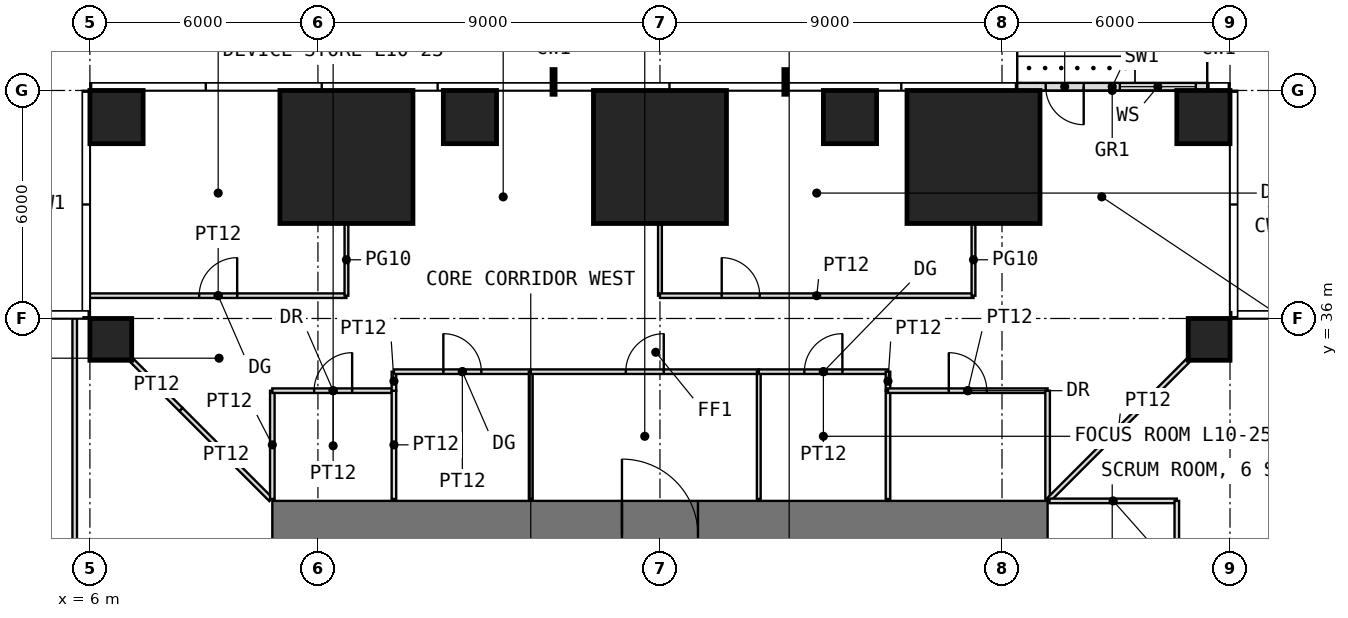
"""IFC4 building model, lengths in metres.
Left out: names, types, materials, properties, quantities, classifications, styles, units other than length and angle.
Written with IfcOpenShell. Run it as: python <this file> out.ifc"""

import sys

from ifc_helpers import new_model, si_unit, direction, frame, frame_2d, origin, origin_2d, place, context, subcontext, project, spatial, rectangle, extrude, element, fill, save


model = new_model("IFC4")
c1 = context("Model", 3, precision=1e-05, world=origin(), true_north=direction((0.0, 1.0)))
c2 = subcontext(c1, "Body", "Model", "MODEL_VIEW")
j1 = project(units=[si_unit("LENGTHUNIT", "METRE"), si_unit("PLANEANGLEUNIT", "RADIAN")], contexts=[c1])
p1 = place(None, origin())
s1 = spatial("IfcSite", under=j1, at=p1, CompositionType="ELEMENT")
p2 = place(p1, origin())
s2 = spatial("IfcBuilding", under=s1, at=p2, CompositionType="ELEMENT")
p3 = place(p2, frame((0.0, 0.0, 46.5)))
s3 = spatial("IfcBuildingStorey", under=s2, at=p3, CompositionType="ELEMENT", Elevation=46.5)
for number, where, z_axis, x_axis in (
    (1, (6.55, 35.45, 0.0), (0.0, 0.0, 1.0), (1.0, 0.0, 0.0)),
    (2, (35.45, 35.45, 0.0), (0.0, 0.0, 1.0), (1.0, 0.0, 0.0)),
):
    element("IfcColumn", number, at=place(p3, frame(where, z_axis=z_axis, x_axis=x_axis)), inside=s3, PredefinedType="COLUMN", context=c2, shape_type="SweptSolid", body=[
        extrude(rectangle(XDim=1.1, YDim=1.1, at=origin_2d()), origin(), (0.0, 0.0, 1.0), 4.0),
    ])
p4 = place(p3, frame((6.7, 41.3, 0.0), z_axis=(0.0, 0.0, 1.0), x_axis=(1.0, 0.0, 0.0)))
e3 = element("IfcColumn", 3, at=p4, inside=s3, PredefinedType="COLUMN", context=c2, shape_type="SweptSolid", body=[
    extrude(rectangle(XDim=1.4, YDim=1.4, at=origin_2d()), origin(), (0.0, 0.0, 1.0), 4.0),
])
p5 = place(p3, frame((12.75, 40.25, 0.0), z_axis=(0.0, 0.0, 1.0), x_axis=(1.0, 0.0, 0.0)))
e4 = element("IfcColumn", 4, at=p5, inside=s3, PredefinedType="COLUMN", context=c2, shape_type="SweptSolid", body=[
    extrude(rectangle(XDim=3.5, YDim=3.5, at=origin_2d()), origin(), (0.0, 0.0, 1.0), 4.0),
])
p6 = place(p3, frame((16.0, 41.3, 0.0), z_axis=(0.0, 0.0, 1.0), x_axis=(1.0, 0.0, 0.0)))
e5 = element("IfcColumn", 5, at=p6, inside=s3, PredefinedType="COLUMN", context=c2, shape_type="SweptSolid", body=[
    extrude(rectangle(XDim=1.4, YDim=1.4, at=origin_2d()), origin(), (0.0, 0.0, 1.0), 4.0),
])
p7 = place(p3, frame((21.0, 40.25, 0.0), z_axis=(0.0, 0.0, 1.0), x_axis=(1.0, 0.0, 0.0)))
e6 = element("IfcColumn", 6, at=p7, inside=s3, PredefinedType="COLUMN", context=c2, shape_type="SweptSolid", body=[
    extrude(rectangle(XDim=3.5, YDim=3.5, at=origin_2d()), origin(), (0.0, 0.0, 1.0), 4.0),
])
p8 = place(p3, frame((26.0, 41.3, 0.0), z_axis=(0.0, 0.0, 1.0), x_axis=(1.0, 0.0, 0.0)))
e7 = element("IfcColumn", 7, at=p8, inside=s3, PredefinedType="COLUMN", context=c2, shape_type="SweptSolid", body=[
    extrude(rectangle(XDim=1.4, YDim=1.4, at=origin_2d()), origin(), (0.0, 0.0, 1.0), 4.0),
])
p9 = place(p3, frame((29.25, 40.25, 0.0), z_axis=(0.0, 0.0, 1.0), x_axis=(1.0, 0.0, 0.0)))
e8 = element("IfcColumn", 8, at=p9, inside=s3, PredefinedType="COLUMN", context=c2, shape_type="SweptSolid", body=[
    extrude(rectangle(XDim=3.5, YDim=3.5, at=origin_2d()), origin(), (0.0, 0.0, 1.0), 4.0),
])
p10 = place(p3, frame((35.3, 41.3, 0.0), z_axis=(0.0, 0.0, 1.0), x_axis=(1.0, 0.0, 0.0)))
e9 = element("IfcColumn", 9, at=p10, inside=s3, PredefinedType="COLUMN", context=c2, shape_type="SweptSolid", body=[
    extrude(rectangle(XDim=1.4, YDim=1.4, at=origin_2d()), origin(), (0.0, 0.0, 1.0), 4.0),
])
p11 = place(p3, frame((35.4, 42.1, 0.0), z_axis=(0.0, 0.0, 1.0), x_axis=(-1.0, 0.0, 0.0)))
e10 = element("IfcWall", 10, at=p11, inside=s3, PredefinedType="USERDEFINED", context=c2, shape_type="SweptSolid", body=[
    extrude(rectangle(XDim=5.0, YDim=0.2, at=frame_2d((2.5, 0.0))), origin(), (0.0, 0.0, 1.0), 3.75),
])
p12 = place(p11, frame((3.25, 0.0, 0.0)))
e11 = element("IfcOpeningElement", 11, at=p12, cuts=e10, PredefinedType="OPENING", context=c2, shape_type="SweptSolid", body=[
    extrude(rectangle(XDim=1.0, YDim=2.4, at=frame_2d((0.5, 1.2))), frame((0.0, 0.11, 0.0), z_axis=(0.0, -1.0, 0.0), x_axis=(1.0, 0.0, 0.0)), (0.0, 0.0, 1.0), 0.22),
])
p13 = place(p11, frame((0.3, 0.0, 0.3)))
e12 = element("IfcOpeningElement", 12, at=p13, cuts=e10, PredefinedType="OPENING", context=c2, shape_type="SweptSolid", body=[
    extrude(rectangle(XDim=2.0, YDim=2.7, at=frame_2d((1.0, 1.35))), frame((0.0, 0.11, 0.0), z_axis=(0.0, -1.0, 0.0), x_axis=(1.0, 0.0, 0.0)), (0.0, 0.0, 1.0), 0.22),
])
p14 = place(p3, frame((10.8, 30.3, -0.05), z_axis=(0.0, 0.0, 1.0), x_axis=(1.0, 0.0, 0.0)))
e13 = element("IfcWall", 13, at=p14, inside=s3, PredefinedType="SHEAR", context=c2, shape_type="SweptSolid", body=[
    extrude(rectangle(XDim=20.4, YDim=1.8, at=frame_2d((10.2, 0.0))), origin(), (0.0, 0.0, 1.0), 4.0),
])
p15 = place(p14, frame((9.2, 0.0, 0.05)))
e14 = element("IfcOpeningElement", 14, at=p15, cuts=e13, PredefinedType="OPENING", context=c2, shape_type="SweptSolid", body=[
    extrude(rectangle(XDim=2.0, YDim=2.2, at=frame_2d((1.0, 1.1))), frame((0.0, 0.91, 0.0), z_axis=(0.0, -1.0, 0.0), x_axis=(1.0, 0.0, 0.0)), (0.0, 0.0, 1.0), 1.82),
])
p16 = place(p3, frame((5.6, 6.0, 0.0), z_axis=(0.0, 0.0, 1.0), x_axis=(0.0, 1.0, 0.0)))
e15 = element("IfcWall", 15, at=p16, inside=s3, PredefinedType="PARTITIONING", context=c2, shape_type="SweptSolid", body=[
    extrude(rectangle(XDim=30.0, YDim=0.12, at=frame_2d((15.0, 0.0))), origin(), (0.0, 0.0, 1.0), 3.75),
])
p17 = place(p16, frame((14.5, 0.0, 0.0)))
e16 = element("IfcOpeningElement", 16, at=p17, cuts=e15, PredefinedType="OPENING", context=c2, shape_type="SweptSolid", body=[
    extrude(rectangle(XDim=1.0, YDim=2.4, at=frame_2d((0.5, 1.2))), frame((0.0, 0.07, 0.0), z_axis=(0.0, -1.0, 0.0), x_axis=(1.0, 0.0, 0.0)), (0.0, 0.0, 1.0), 0.14),
])
p18 = place(p3, frame((6.0, 36.6, 0.0), z_axis=(0.0, 0.0, 1.0), x_axis=(1.0, 0.0, 0.0)))
e17 = element("IfcWall", 17, at=p18, inside=s3, PredefinedType="PARTITIONING", context=c2, shape_type="SweptSolid", body=[
    extrude(rectangle(XDim=6.75, YDim=0.12, at=frame_2d((3.375, 0.0))), origin(), (0.0, 0.0, 1.0), 3.75),
])
p19 = place(p18, frame((2.875, 0.0, 0.0)))
e18 = element("IfcOpeningElement", 18, at=p19, cuts=e17, PredefinedType="OPENING", context=c2, shape_type="SweptSolid", body=[
    extrude(rectangle(XDim=1.0, YDim=2.4, at=frame_2d((0.5, 1.2))), frame((0.0, 0.07, 0.0), z_axis=(0.0, -1.0, 0.0), x_axis=(1.0, 0.0, 0.0)), (0.0, 0.0, 1.0), 0.14),
])
p20 = place(p3, frame((7.11, 34.89, 0.0), z_axis=(0.0, 0.0, 1.0), x_axis=(0.707106781187, -0.707106781187, 0.0)))
e19 = element("IfcWall", 19, at=p20, inside=s3, PredefinedType="PARTITIONING", context=c2, shape_type="SweptSolid", body=[
    extrude(rectangle(XDim=1.822, YDim=0.12, at=frame_2d((0.911, 0.0))), origin(), (0.0, 0.0, 1.0), 3.75),
])
p21 = place(p3, frame((8.398, 33.602, 0.0), z_axis=(0.0, 0.0, 1.0), x_axis=(0.707106781187, -0.707106781187, 0.0)))
e20 = element("IfcWall", 20, at=p21, inside=s3, PredefinedType="PARTITIONING", context=c2, shape_type="SweptSolid", body=[
    extrude(rectangle(XDim=3.346, YDim=0.12, at=frame_2d((1.673, 0.0))), origin(), (0.0, 0.0, 1.0), 3.75),
])
p22 = place(p3, frame((10.8, 31.25, 0.0), z_axis=(0.0, 0.0, 1.0), x_axis=(0.0, 1.0, 0.0)))
e21 = element("IfcWall", 21, at=p22, inside=s3, PredefinedType="PARTITIONING", context=c2, shape_type="SweptSolid", body=[
    extrude(rectangle(XDim=2.85, YDim=0.12, at=frame_2d((1.425, 0.0))), origin(), (0.0, 0.0, 1.0), 3.75),
])
p23 = place(p3, frame((10.8, 34.1, 0.0), z_axis=(0.0, 0.0, 1.0), x_axis=(1.0, 0.0, 0.0)))
e22 = element("IfcWall", 22, at=p23, inside=s3, PredefinedType="PARTITIONING", context=c2, shape_type="SweptSolid", body=[
    extrude(rectangle(XDim=3.2, YDim=0.12, at=frame_2d((1.6, 0.0))), origin(), (0.0, 0.0, 1.0), 3.75),
])
p24 = place(p23, frame((1.1, 0.0, 0.0)))
e23 = element("IfcOpeningElement", 23, at=p24, cuts=e22, PredefinedType="OPENING", context=c2, shape_type="SweptSolid", body=[
    extrude(rectangle(XDim=1.0, YDim=2.2, at=frame_2d((0.5, 1.1))), frame((0.0, 0.07, 0.0), z_axis=(0.0, -1.0, 0.0), x_axis=(1.0, 0.0, 0.0)), (0.0, 0.0, 1.0), 0.14),
])
p25 = place(p3, frame((12.75, 36.6, 0.0), z_axis=(0.0, 0.0, 1.0), x_axis=(0.0, 1.0, 0.0)))
e24 = element("IfcWall", 24, at=p25, inside=s3, PredefinedType="PARTITIONING", context=c2, shape_type="SweptSolid", body=[
    extrude(rectangle(XDim=1.89, YDim=0.1, at=frame_2d((0.945, 0.0))), origin(), (0.0, 0.0, 1.0), 3.75),
])
p26 = place(p3, frame((14.0, 31.25, 0.0), z_axis=(0.0, 0.0, 1.0), x_axis=(0.0, 1.0, 0.0)))
e25 = element("IfcWall", 25, at=p26, inside=s3, PredefinedType="PARTITIONING", context=c2, shape_type="SweptSolid", body=[
    extrude(rectangle(XDim=2.85, YDim=0.12, at=frame_2d((1.425, 0.0))), origin(), (0.0, 0.0, 1.0), 3.75),
])
p27 = place(p3, frame((14.0, 34.1, 0.0), z_axis=(0.0, 0.0, 1.0), x_axis=(0.0, 1.0, 0.0)))
e26 = element("IfcWall", 26, at=p27, inside=s3, PredefinedType="PARTITIONING", context=c2, shape_type="SweptSolid", body=[
    extrude(rectangle(XDim=0.5, YDim=0.12, at=frame_2d((0.25, 0.0))), origin(), (0.0, 0.0, 1.0), 3.75),
])
p28 = place(p3, frame((14.0, 34.6, 0.0), z_axis=(0.0, 0.0, 1.0), x_axis=(1.0, 0.0, 0.0)))
e27 = element("IfcWall", 27, at=p28, inside=s3, PredefinedType="PARTITIONING", context=c2, shape_type="SweptSolid", body=[
    extrude(rectangle(XDim=3.6, YDim=0.12, at=frame_2d((1.8, 0.0))), origin(), (0.0, 0.0, 1.0), 3.75),
])
p29 = place(p28, frame((1.3, 0.0, 0.0)))
e28 = element("IfcOpeningElement", 28, at=p29, cuts=e27, PredefinedType="OPENING", context=c2, shape_type="SweptSolid", body=[
    extrude(rectangle(XDim=1.0, YDim=2.4, at=frame_2d((0.5, 1.2))), frame((0.0, 0.07, 0.0), z_axis=(0.0, -1.0, 0.0), x_axis=(1.0, 0.0, 0.0)), (0.0, 0.0, 1.0), 0.14),
])
p30 = place(p3, frame((17.6, 31.25, 0.0), z_axis=(0.0, 0.0, 1.0), x_axis=(0.0, 1.0, 0.0)))
e29 = element("IfcWall", 29, at=p30, inside=s3, PredefinedType="PARTITIONING", context=c2, shape_type="SweptSolid", body=[
    extrude(rectangle(XDim=3.35, YDim=0.1, at=frame_2d((1.675, 0.0))), origin(), (0.0, 0.0, 1.0), 3.75),
])
p31 = place(p3, frame((17.6, 34.6, 0.0), z_axis=(0.0, 0.0, 1.0), x_axis=(1.0, 0.0, 0.0)))
e30 = element("IfcWall", 30, at=p31, inside=s3, PredefinedType="PARTITIONING", context=c2, shape_type="SweptSolid", body=[
    extrude(rectangle(XDim=6.0, YDim=0.12, at=frame_2d((3.0, 0.0))), origin(), (0.0, 0.0, 1.0), 3.75),
])
p32 = place(p31, frame((2.5, 0.0, 0.0)))
e31 = element("IfcOpeningElement", 31, at=p32, cuts=e30, PredefinedType="OPENING", context=c2, shape_type="SweptSolid", body=[
    extrude(rectangle(XDim=1.0, YDim=2.4, at=frame_2d((0.5, 1.2))), frame((0.0, 0.07, 0.0), z_axis=(0.0, -1.0, 0.0), x_axis=(1.0, 0.0, 0.0)), (0.0, 0.0, 1.0), 0.14),
])
p33 = place(p3, frame((21.0, 36.6, 0.0), z_axis=(0.0, 0.0, 1.0), x_axis=(0.0, 1.0, 0.0)))
e32 = element("IfcWall", 32, at=p33, inside=s3, PredefinedType="PARTITIONING", context=c2, shape_type="SweptSolid", body=[
    extrude(rectangle(XDim=1.89, YDim=0.1, at=frame_2d((0.945, 0.0))), origin(), (0.0, 0.0, 1.0), 3.75),
])
p34 = place(p3, frame((21.0, 36.6, 0.0), z_axis=(0.0, 0.0, 1.0), x_axis=(1.0, 0.0, 0.0)))
e33 = element("IfcWall", 33, at=p34, inside=s3, PredefinedType="PARTITIONING", context=c2, shape_type="SweptSolid", body=[
    extrude(rectangle(XDim=8.25, YDim=0.12, at=frame_2d((4.125, 0.0))), origin(), (0.0, 0.0, 1.0), 3.75),
])
p35 = place(p34, frame((1.625, 0.0, 0.0)))
e34 = element("IfcOpeningElement", 34, at=p35, cuts=e33, PredefinedType="OPENING", context=c2, shape_type="SweptSolid", body=[
    extrude(rectangle(XDim=1.0, YDim=2.4, at=frame_2d((0.5, 1.2))), frame((0.0, 0.07, 0.0), z_axis=(0.0, -1.0, 0.0), x_axis=(1.0, 0.0, 0.0)), (0.0, 0.0, 1.0), 0.14),
])
p36 = place(p3, frame((23.6, 31.25, 0.0), z_axis=(0.0, 0.0, 1.0), x_axis=(0.0, 1.0, 0.0)))
e35 = element("IfcWall", 35, at=p36, inside=s3, PredefinedType="PARTITIONING", context=c2, shape_type="SweptSolid", body=[
    extrude(rectangle(XDim=3.35, YDim=0.1, at=frame_2d((1.675, 0.0))), origin(), (0.0, 0.0, 1.0), 3.75),
])
p37 = place(p3, frame((23.6, 34.6, 0.0), z_axis=(0.0, 0.0, 1.0), x_axis=(1.0, 0.0, 0.0)))
e36 = element("IfcWall", 36, at=p37, inside=s3, PredefinedType="PARTITIONING", context=c2, shape_type="SweptSolid", body=[
    extrude(rectangle(XDim=3.4, YDim=0.12, at=frame_2d((1.7, 0.0))), origin(), (0.0, 0.0, 1.0), 3.75),
])
p38 = place(p37, frame((1.2, 0.0, 0.0)))
e37 = element("IfcOpeningElement", 37, at=p38, cuts=e36, PredefinedType="OPENING", context=c2, shape_type="SweptSolid", body=[
    extrude(rectangle(XDim=1.0, YDim=2.4, at=frame_2d((0.5, 1.2))), frame((0.0, 0.07, 0.0), z_axis=(0.0, -1.0, 0.0), x_axis=(1.0, 0.0, 0.0)), (0.0, 0.0, 1.0), 0.14),
])
p39 = place(p3, frame((27.0, 31.25, 0.0), z_axis=(0.0, 0.0, 1.0), x_axis=(0.0, 1.0, 0.0)))
e38 = element("IfcWall", 38, at=p39, inside=s3, PredefinedType="PARTITIONING", context=c2, shape_type="SweptSolid", body=[
    extrude(rectangle(XDim=2.85, YDim=0.12, at=frame_2d((1.425, 0.0))), origin(), (0.0, 0.0, 1.0), 3.75),
])
p40 = place(p3, frame((27.0, 34.1, 0.0), z_axis=(0.0, 0.0, 1.0), x_axis=(0.0, 1.0, 0.0)))
e39 = element("IfcWall", 39, at=p40, inside=s3, PredefinedType="PARTITIONING", context=c2, shape_type="SweptSolid", body=[
    extrude(rectangle(XDim=0.5, YDim=0.12, at=frame_2d((0.25, 0.0))), origin(), (0.0, 0.0, 1.0), 3.75),
])
p41 = place(p3, frame((27.0, 34.1, 0.0), z_axis=(0.0, 0.0, 1.0), x_axis=(1.0, 0.0, 0.0)))
e40 = element("IfcWall", 40, at=p41, inside=s3, PredefinedType="PARTITIONING", context=c2, shape_type="SweptSolid", body=[
    extrude(rectangle(XDim=4.2, YDim=0.12, at=frame_2d((2.1, 0.0))), origin(), (0.0, 0.0, 1.0), 3.75),
])
p42 = place(p41, frame((1.6, 0.0, 0.0)))
e41 = element("IfcOpeningElement", 41, at=p42, cuts=e40, PredefinedType="OPENING", context=c2, shape_type="SweptSolid", body=[
    extrude(rectangle(XDim=1.0, YDim=2.2, at=frame_2d((0.5, 1.1))), frame((0.0, 0.07, 0.0), z_axis=(0.0, -1.0, 0.0), x_axis=(1.0, 0.0, 0.0)), (0.0, 0.0, 1.0), 0.14),
])
p43 = place(p3, frame((29.25, 36.6, 0.0), z_axis=(0.0, 0.0, 1.0), x_axis=(0.0, 1.0, 0.0)))
e42 = element("IfcWall", 42, at=p43, inside=s3, PredefinedType="PARTITIONING", context=c2, shape_type="SweptSolid", body=[
    extrude(rectangle(XDim=1.89, YDim=0.1, at=frame_2d((0.945, 0.0))), origin(), (0.0, 0.0, 1.0), 3.75),
])
p44 = place(p3, frame((31.2, 31.25, 0.0), z_axis=(0.0, 0.0, 1.0), x_axis=(0.0, 1.0, 0.0)))
e43 = element("IfcWall", 43, at=p44, inside=s3, PredefinedType="PARTITIONING", context=c2, shape_type="SweptSolid", body=[
    extrude(rectangle(XDim=2.85, YDim=0.12, at=frame_2d((1.425, 0.0))), origin(), (0.0, 0.0, 1.0), 3.75),
])
p45 = place(p3, frame((31.235, 31.235, 0.0), z_axis=(0.0, 0.0, 1.0), x_axis=(0.707106781187, 0.707106781187, 0.0)))
e44 = element("IfcWall", 44, at=p45, inside=s3, PredefinedType="PARTITIONING", context=c2, shape_type="SweptSolid", body=[
    extrude(rectangle(XDim=5.168, YDim=0.12, at=frame_2d((2.584, 0.0))), origin(), (0.0, 0.0, 1.0), 3.75),
])
p46 = place(p3, frame((31.25, 31.2, 0.0), z_axis=(0.0, 0.0, 1.0), x_axis=(1.0, 0.0, 0.0)))
e45 = element("IfcWall", 45, at=p46, inside=s3, PredefinedType="PARTITIONING", context=c2, shape_type="SweptSolid", body=[
    extrude(rectangle(XDim=3.35, YDim=0.12, at=frame_2d((1.675, 0.0))), origin(), (0.0, 0.0, 1.0), 3.75),
])
p47 = place(p3, frame((34.6, 25.4, 0.0), z_axis=(0.0, 0.0, 1.0), x_axis=(0.0, 1.0, 0.0)))
e46 = element("IfcWall", 46, at=p47, inside=s3, PredefinedType="PARTITIONING", context=c2, shape_type="SweptSolid", body=[
    extrude(rectangle(XDim=5.8, YDim=0.12, at=frame_2d((2.9, 0.0))), origin(), (0.0, 0.0, 1.0), 3.75),
])
p48 = place(p47, frame((2.4, 0.0, 0.0)))
e47 = element("IfcOpeningElement", 47, at=p48, cuts=e46, PredefinedType="OPENING", context=c2, shape_type="SweptSolid", body=[
    extrude(rectangle(XDim=1.0, YDim=2.4, at=frame_2d((0.5, 1.2))), frame((0.0, 0.07, 0.0), z_axis=(0.0, -1.0, 0.0), x_axis=(1.0, 0.0, 0.0)), (0.0, 0.0, 1.0), 0.14),
])
p49 = place(p12, origin())
e48 = element("IfcDoor", 48, at=p49, inside=s3, OperationType="SINGLE_SWING_LEFT", PredefinedType="DOOR", context=c2, shape_type="SweptSolid", body=[
    extrude(rectangle(XDim=1.0, YDim=2.4, at=frame_2d((0.5, 1.2))), frame((0.0, 0.025, 0.0), z_axis=(0.0, -1.0, 0.0), x_axis=(1.0, 0.0, 0.0)), (0.0, 0.0, 1.0), 0.05),
])
fill(e11, e48)
p50 = place(p13, origin())
e49 = element("IfcWindow", 49, at=p50, inside=s3, PartitioningType="SINGLE_PANEL", PredefinedType="WINDOW", context=c2, shape_type="SweptSolid", body=[
    extrude(rectangle(XDim=2.0, YDim=2.7, at=frame_2d((1.0, 1.35))), frame((0.0, 0.03, 0.0), z_axis=(0.0, -1.0, 0.0), x_axis=(1.0, 0.0, 0.0)), (0.0, 0.0, 1.0), 0.06),
])
fill(e12, e49)
p51 = place(p15, origin())
e50 = element("IfcDoor", 50, at=p51, inside=s3, OperationType="DOUBLE_DOOR_SINGLE_SWING", PredefinedType="DOOR", context=c2, shape_type="SweptSolid", body=[
    extrude(rectangle(XDim=2.0, YDim=2.2, at=frame_2d((1.0, 1.1))), frame((0.0, 0.025, 0.0), z_axis=(0.0, -1.0, 0.0), x_axis=(1.0, 0.0, 0.0)), (0.0, 0.0, 1.0), 0.05),
])
fill(e14, e50)
p52 = place(p24, origin())
e51 = element("IfcDoor", 51, at=p52, inside=s3, OperationType="SINGLE_SWING_RIGHT", PredefinedType="DOOR", context=c2, shape_type="SweptSolid", body=[
    extrude(rectangle(XDim=1.0, YDim=2.2, at=frame_2d((0.5, 1.1))), frame((0.0, 0.025, 0.0), z_axis=(0.0, -1.0, 0.0), x_axis=(1.0, 0.0, 0.0)), (0.0, 0.0, 1.0), 0.05),
])
fill(e23, e51)
p53 = place(p29, origin())
e52 = element("IfcDoor", 52, at=p53, inside=s3, OperationType="SINGLE_SWING_LEFT", PredefinedType="DOOR", context=c2, shape_type="SweptSolid", body=[
    extrude(rectangle(XDim=1.0, YDim=2.4, at=frame_2d((0.5, 1.2))), frame((0.0, 0.025, 0.0), z_axis=(0.0, -1.0, 0.0), x_axis=(1.0, 0.0, 0.0)), (0.0, 0.0, 1.0), 0.05),
])
fill(e28, e52)
p54 = place(p38, origin())
e53 = element("IfcDoor", 53, at=p54, inside=s3, OperationType="SINGLE_SWING_RIGHT", PredefinedType="DOOR", context=c2, shape_type="SweptSolid", body=[
    extrude(rectangle(XDim=1.0, YDim=2.4, at=frame_2d((0.5, 1.2))), frame((0.0, 0.025, 0.0), z_axis=(0.0, -1.0, 0.0), x_axis=(1.0, 0.0, 0.0)), (0.0, 0.0, 1.0), 0.05),
])
fill(e37, e53)
p55 = place(p42, origin())
e54 = element("IfcDoor", 54, at=p55, inside=s3, OperationType="SINGLE_SWING_LEFT", PredefinedType="DOOR", context=c2, shape_type="SweptSolid", body=[
    extrude(rectangle(XDim=1.0, YDim=2.2, at=frame_2d((0.5, 1.1))), frame((0.0, 0.025, 0.0), z_axis=(0.0, -1.0, 0.0), x_axis=(1.0, 0.0, 0.0)), (0.0, 0.0, 1.0), 0.05),
])
fill(e41, e54)
p56 = place(p19, origin())
e55 = element("IfcDoor", 55, at=p56, inside=s3, OperationType="SINGLE_SWING_RIGHT", PredefinedType="DOOR", context=c2, shape_type="SweptSolid", body=[
    extrude(rectangle(XDim=1.0, YDim=2.4, at=frame_2d((0.5, 1.2))), frame((0.0, 0.025, 0.0), z_axis=(0.0, -1.0, 0.0), x_axis=(1.0, 0.0, 0.0)), (0.0, 0.0, 1.0), 0.05),
])
fill(e18, e55)
p57 = place(p35, origin())
e56 = element("IfcDoor", 56, at=p57, inside=s3, OperationType="SINGLE_SWING_LEFT", PredefinedType="DOOR", context=c2, shape_type="SweptSolid", body=[
    extrude(rectangle(XDim=1.0, YDim=2.4, at=frame_2d((0.5, 1.2))), frame((0.0, 0.025, 0.0), z_axis=(0.0, -1.0, 0.0), x_axis=(1.0, 0.0, 0.0)), (0.0, 0.0, 1.0), 0.05),
])
fill(e34, e56)
p58 = place(p32, origin())
e57 = element("IfcDoor", 57, at=p58, inside=s3, OperationType="SINGLE_SWING_RIGHT", PredefinedType="DOOR", context=c2, shape_type="SweptSolid", body=[
    extrude(rectangle(XDim=1.0, YDim=2.4, at=frame_2d((0.5, 1.2))), frame((0.0, 0.025, 0.0), z_axis=(0.0, -1.0, 0.0), x_axis=(1.0, 0.0, 0.0)), (0.0, 0.0, 1.0), 0.05),
])
fill(e31, e57)
save(model, sys.argv[1])
